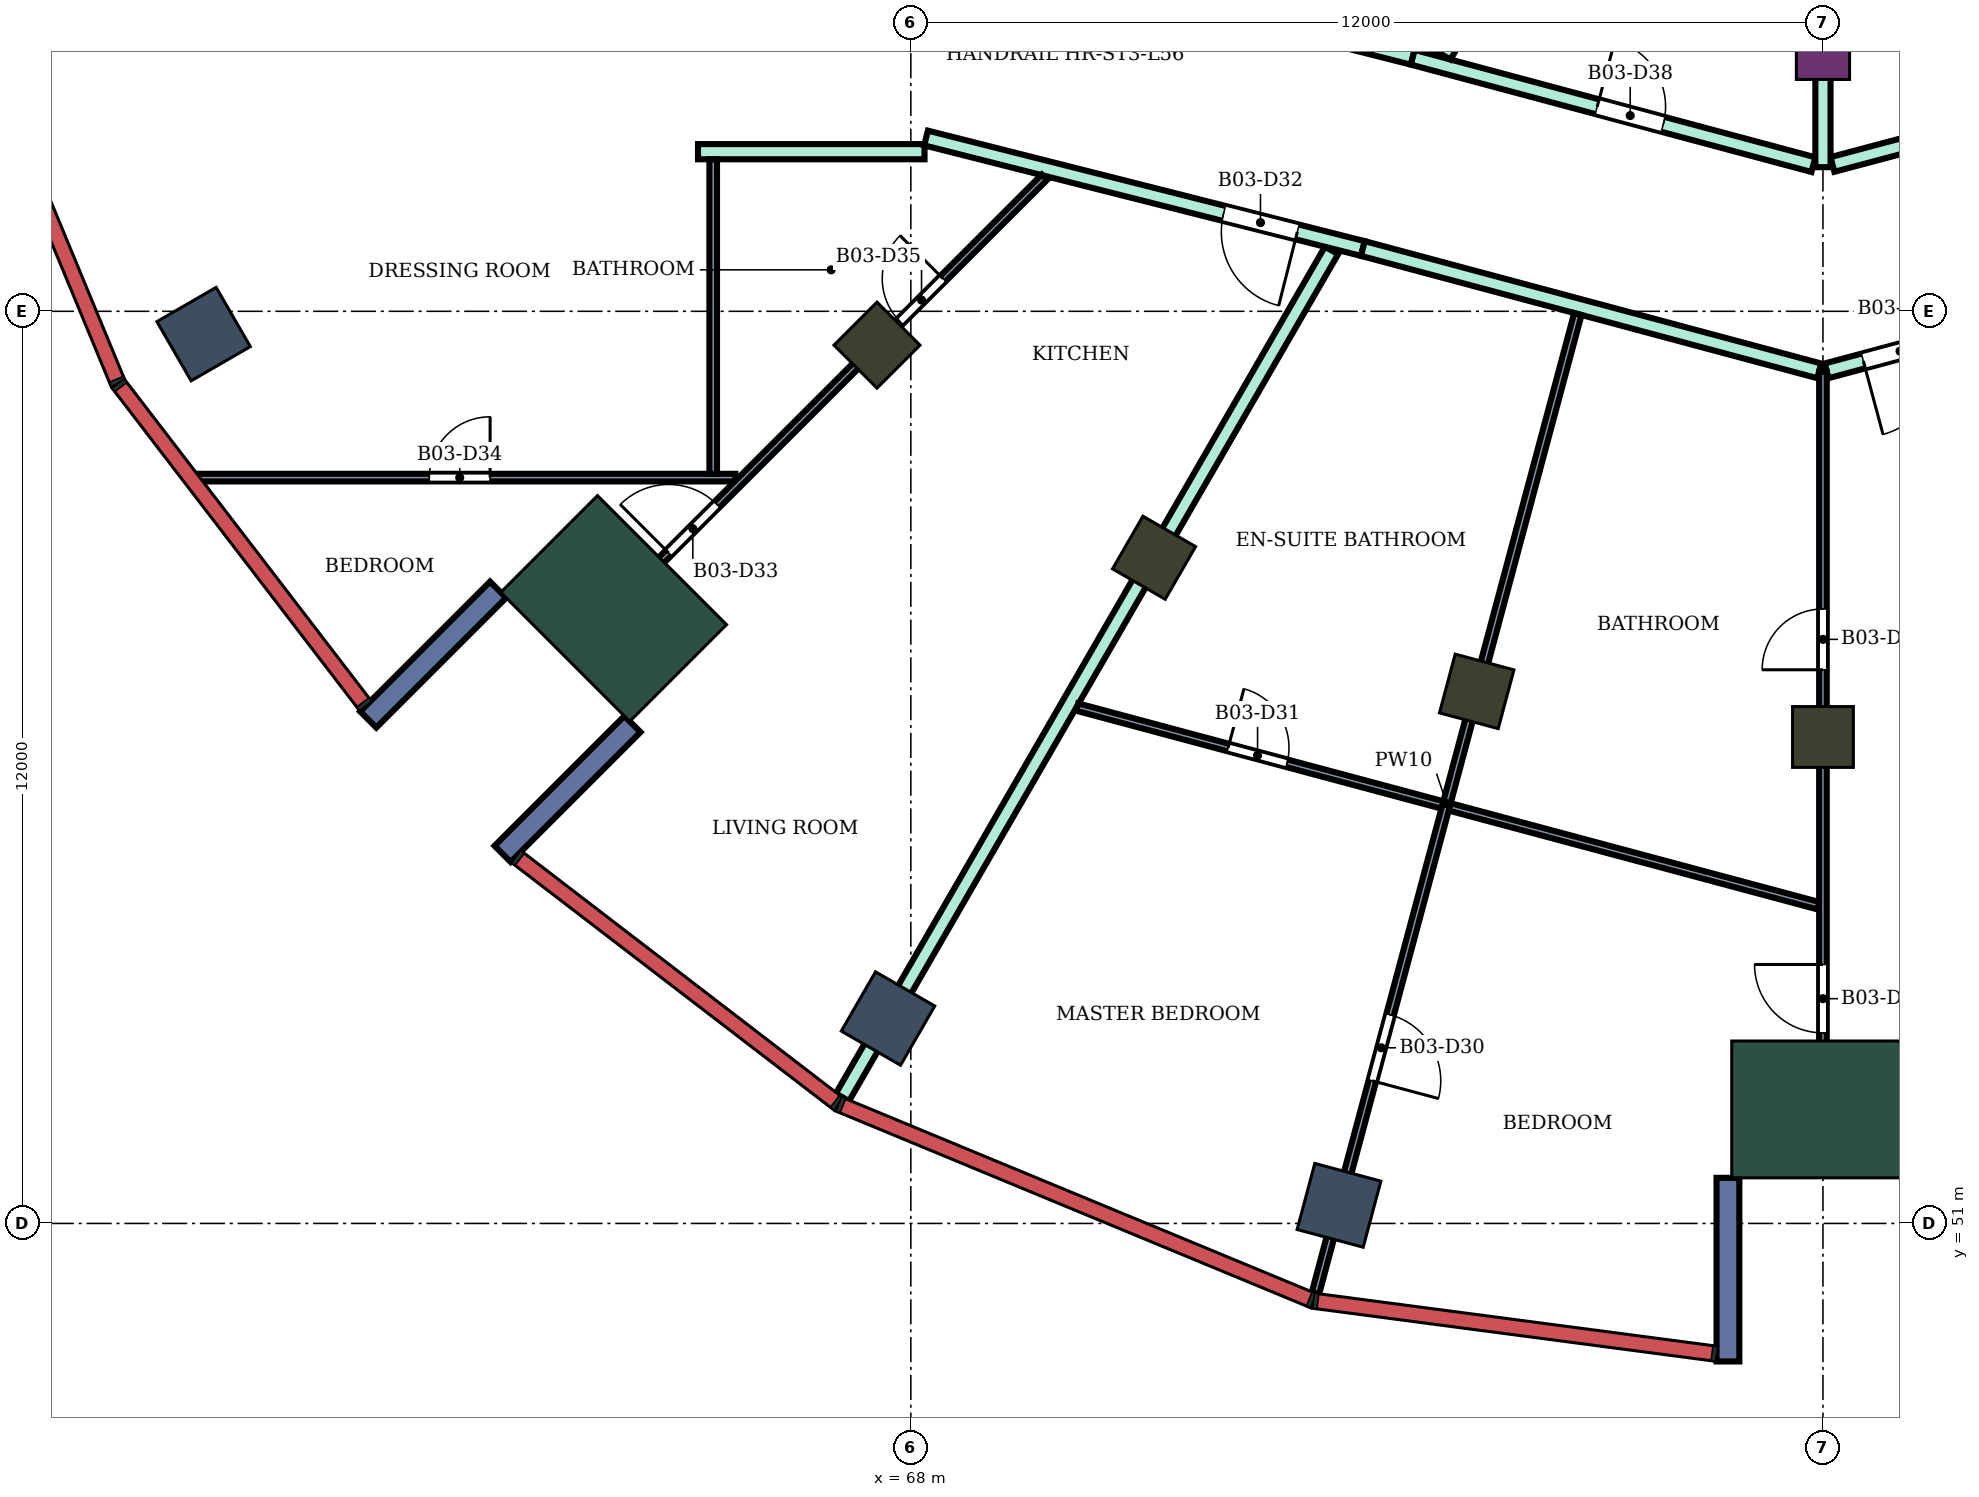
"""IFC4 building model, lengths in metres.
Left out: names, types, materials, properties, quantities, classifications, styles, units other than length and angle.
Written with IfcOpenShell. Run it as: python <this file> out.ifc"""

import sys

from ifc_helpers import new_model, si_unit, direction, frame, frame_2d, origin, origin_2d, place, context, subcontext, project, spatial, rectangle, extrude, element, fill, save


model = new_model("IFC4")
c1 = context("Model", 3, precision=1e-05, world=origin(), true_north=direction((0.0, 1.0)))
c2 = subcontext(c1, "Body", "Model", "MODEL_VIEW")
j1 = project(units=[si_unit("LENGTHUNIT", "METRE"), si_unit("PLANEANGLEUNIT", "RADIAN")], contexts=[c1])
p1 = place(None, origin())
s1 = spatial("IfcSite", under=j1, at=p1, CompositionType="ELEMENT")
p2 = place(p1, origin())
s2 = spatial("IfcBuilding", under=s1, at=p2, CompositionType="ELEMENT")
p3 = place(p2, frame((0.0, 0.0, 245.7)))
s3 = spatial("IfcBuildingStorey", under=s2, at=p3, CompositionType="ELEMENT", Elevation=245.7)
for number, where, z_axis, x_axis in (
    (1, (58.696, 62.7, 0.0), (0.0, 0.0, 1.0), (-0.866, -0.5, 0.0)),
    (2, (67.7, 53.696, 0.0), (0.0, 0.0, 1.0), (-0.5, -0.866, 0.0)),
    (3, (73.633, 51.238, 0.0), (0.0, 0.0, 1.0), (-0.259, -0.966, 0.0)),
):
    element("IfcColumn", number, at=place(p3, frame(where, z_axis=z_axis, x_axis=x_axis)), inside=s3, PredefinedType="COLUMN", context=c2, shape_type="SweptSolid", body=[
        extrude(rectangle(XDim=0.9, YDim=0.9, at=origin_2d()), origin(), (0.0, 0.0, 1.0), 4.2),
    ])
for number, where, z_axis, x_axis in (
    (4, (67.555, 62.555, 0.0), (0.0, 0.0, 1.0), (-0.707, -0.707, 0.0)),
    (5, (71.2, 59.758, 0.0), (0.0, 0.0, 1.0), (-0.5, -0.866, 0.0)),
    (6, (75.445, 58.0, 0.0), (0.0, 0.0, 1.0), (-0.259, -0.966, 0.0)),
    (7, (80.0, 57.4, 0.0), (0.0, 0.0, 1.0), (0.0, -1.0, 0.0)),
):
    element("IfcColumn", number, at=place(p3, frame(where, z_axis=z_axis, x_axis=x_axis)), inside=s3, PredefinedType="COLUMN", context=c2, shape_type="SweptSolid", body=[
        extrude(rectangle(XDim=0.8, YDim=0.8, at=origin_2d()), origin(), (0.0, 0.0, 1.0), 4.2),
    ])
p4 = place(p3, frame((80.0, 66.4, 0.0), z_axis=(0.0, 0.0, 1.0), x_axis=(0.0, -1.0, 0.0)))
e8 = element("IfcColumn", 8, at=p4, inside=s3, PredefinedType="COLUMN", context=c2, shape_type="SweptSolid", body=[
    extrude(rectangle(XDim=0.7, YDim=0.7, at=origin_2d()), origin(), (0.0, 0.0, 1.0), 4.2),
])
for number, where, z_axis, x_axis in (
    (9, (64.09, 59.09, 0.0), (0.0, 0.0, 1.0), (-0.707, -0.707, 0.0)),
    (10, (80.0, 52.5, 0.0), (0.0, 0.0, 1.0), (0.0, -1.0, 0.0)),
):
    element("IfcColumn", number, at=place(p3, frame(where, z_axis=z_axis, x_axis=x_axis)), inside=s3, PredefinedType="COLUMN", context=c2, shape_type="SweptSolid", body=[
        extrude(rectangle(XDim=1.8, YDim=2.4, at=origin_2d()), origin(), (0.0, 0.0, 1.0), 4.2),
    ])
for number, where, z_axis, x_axis in (
    (11, (62.57, 59.338, 0.0), (0.0, 0.0, 1.0), (-0.707, -0.707, 0.0)),
    (12, (64.338, 57.57, 0.0), (0.0, 0.0, 1.0), (-0.707, -0.707, 0.0)),
    (13, (78.75, 51.6, 0.0), (0.0, 0.0, 1.0), (0.0, -1.0, 0.0)),
):
    element("IfcWall", number, at=place(p3, frame(where, z_axis=z_axis, x_axis=x_axis)), inside=s3, PredefinedType="NOTDEFINED", context=c2, shape_type="SweptSolid", body=[
        extrude(rectangle(XDim=2.416, YDim=0.3, at=frame_2d((1.208, 0.0))), origin(), (0.0, 0.0, 1.0), 4.2),
    ])
p5 = place(p3, frame((65.2, 65.1, 0.0), z_axis=(0.0, 0.0, 1.0), x_axis=(1.0, 0.0, 0.0)))
e14 = element("IfcWall", 14, at=p5, inside=s3, PredefinedType="PARTITIONING", context=c2, shape_type="SweptSolid", body=[
    extrude(rectangle(XDim=2.98, YDim=0.2, at=frame_2d((1.49, 0.0))), origin(), (0.0, 0.0, 1.0), 3.75),
])
p6 = place(p3, frame((67.1, 52.659, 0.0), z_axis=(0.0, 0.0, 1.0), x_axis=(0.500128690501, 0.865951091539, 0.0)))
e15 = element("IfcWall", 15, at=p6, inside=s3, PredefinedType="PARTITIONING", context=c2, shape_type="SweptSolid", body=[
    extrude(rectangle(XDim=12.866, YDim=0.2, at=frame_2d((6.433, 0.0))), origin(), (0.0, 0.0, 1.0), 3.75),
])
p7 = place(p3, frame((68.2, 65.28, 0.0), z_axis=(0.0, 0.0, 1.0), x_axis=(0.969450596516, -0.245286650503, 0.0)))
e16 = element("IfcWall", 16, at=p7, inside=s3, PredefinedType="PARTITIONING", context=c2, shape_type="SweptSolid", body=[
    extrude(rectangle(XDim=5.928, YDim=0.2, at=frame_2d((2.964, 0.0))), origin(), (0.0, 0.0, 1.0), 3.75),
])
p8 = place(p7, frame((4.039, 0.0, 0.0)))
e17 = element("IfcOpeningElement", 17, at=p8, cuts=e16, PredefinedType="OPENING", context=c2, shape_type="SweptSolid", body=[
    extrude(rectangle(XDim=1.0, YDim=2.1, at=frame_2d((0.5, 1.05))), frame((0.0, 0.11, 0.0), z_axis=(0.0, -1.0, 0.0), x_axis=(1.0, 0.0, 0.0)), (0.0, 0.0, 1.0), 0.22),
])
p9 = place(p3, frame((72.1, 66.975, 0.0), z_axis=(0.0, 0.0, 1.0), x_axis=(0.969471314457, -0.245204752086, 0.0)))
e18 = element("IfcWall", 18, at=p9, inside=s3, PredefinedType="PARTITIONING", context=c2, shape_type="SweptSolid", body=[
    extrude(rectangle(XDim=2.582, YDim=0.2, at=frame_2d((1.291, 0.0))), origin(), (0.0, 0.0, 1.0), 3.75),
])
p10 = place(p9, frame((0.841, 0.0, 0.0)))
e19 = element("IfcOpeningElement", 19, at=p10, cuts=e18, PredefinedType="OPENING", context=c2, shape_type="SweptSolid", body=[
    extrude(rectangle(XDim=0.9, YDim=2.1, at=frame_2d((0.45, 1.05))), frame((0.0, 0.11, 0.0), z_axis=(0.0, -1.0, 0.0), x_axis=(1.0, 0.0, 0.0)), (0.0, 0.0, 1.0), 0.22),
])
p11 = place(p3, frame((73.947, 63.826, 0.0), z_axis=(0.0, 0.0, 1.0), x_axis=(0.965908253407, -0.258884619088, 0.0)))
e20 = element("IfcWall", 20, at=p11, inside=s3, PredefinedType="PARTITIONING", context=c2, shape_type="SweptSolid", body=[
    extrude(rectangle(XDim=6.217, YDim=0.2, at=frame_2d((3.108, 0.0))), origin(), (0.0, 0.0, 1.0), 3.75),
])
p12 = place(p3, frame((74.603, 66.342, 0.0), z_axis=(0.0, 0.0, 1.0), x_axis=(0.965920893652, -0.258837453254, 0.0)))
e21 = element("IfcWall", 21, at=p12, inside=s3, PredefinedType="PARTITIONING", context=c2, shape_type="SweptSolid", body=[
    extrude(rectangle(XDim=5.458, YDim=0.2, at=frame_2d((2.729, 0.0))), origin(), (0.0, 0.0, 1.0), 3.75),
])
p13 = place(p12, frame((2.512, 0.0, 0.0)))
e22 = element("IfcOpeningElement", 22, at=p13, cuts=e21, PredefinedType="OPENING", context=c2, shape_type="SweptSolid", body=[
    extrude(rectangle(XDim=0.9, YDim=2.1, at=frame_2d((0.45, 1.05))), frame((0.0, 0.11, 0.0), z_axis=(0.0, -1.0, 0.0), x_axis=(1.0, 0.0, 0.0)), (0.0, 0.0, 1.0), 0.22),
])
p14 = place(p3, frame((75.014, 66.362, 0.0), z_axis=(0.0, 0.0, 1.0), x_axis=(0.500097042406, 0.865969369075, 0.0)))
e23 = element("IfcWall", 23, at=p14, inside=s3, PredefinedType="PARTITIONING", context=c2, shape_type="SweptSolid", body=[
    extrude(rectangle(XDim=2.275, YDim=0.2, at=frame_2d((1.138, 0.0))), origin(), (0.0, 0.0, 1.0), 3.75),
])
p15 = place(p3, frame((80.125, 64.932, 0.0), z_axis=(0.0, 0.0, 1.0), x_axis=(0.966236955806, 0.257655089674, 0.0)))
e24 = element("IfcWall", 24, at=p15, inside=s3, PredefinedType="PARTITIONING", context=c2, shape_type="SweptSolid", body=[
    extrude(rectangle(XDim=8.039, YDim=0.2, at=frame_2d((4.02, 0.0))), origin(), (0.0, 0.0, 1.0), 3.75),
])
p16 = place(p15, frame((6.298, 0.0, 0.0)))
e25 = element("IfcOpeningElement", 25, at=p16, cuts=e24, PredefinedType="OPENING", context=c2, shape_type="SweptSolid", body=[
    extrude(rectangle(XDim=0.9, YDim=2.1, at=frame_2d((0.45, 1.05))), frame((0.0, 0.11, 0.0), z_axis=(0.0, -1.0, 0.0), x_axis=(1.0, 0.0, 0.0)), (0.0, 0.0, 1.0), 0.22),
])
p17 = place(p15, frame((2.045, 0.0, 0.0)))
e26 = element("IfcOpeningElement", 26, at=p17, cuts=e24, PredefinedType="OPENING", context=c2, shape_type="SweptSolid", body=[
    extrude(rectangle(XDim=0.9, YDim=2.1, at=frame_2d((0.45, 1.05))), frame((0.0, 0.11, 0.0), z_axis=(0.0, -1.0, 0.0), x_axis=(1.0, 0.0, 0.0)), (0.0, 0.0, 1.0), 0.22),
])
p18 = place(p3, frame((80.048, 62.217, 0.0), z_axis=(0.0, 0.0, 1.0), x_axis=(0.965941520544, 0.258760466242, 0.0)))
e27 = element("IfcWall", 27, at=p18, inside=s3, PredefinedType="PARTITIONING", context=c2, shape_type="SweptSolid", body=[
    extrude(rectangle(XDim=6.006, YDim=0.2, at=frame_2d((3.003, 0.0))), origin(), (0.0, 0.0, 1.0), 3.75),
])
p19 = place(p18, frame((0.5, 0.0, 0.0)))
e28 = element("IfcOpeningElement", 28, at=p19, cuts=e27, PredefinedType="OPENING", context=c2, shape_type="SweptSolid", body=[
    extrude(rectangle(XDim=1.0, YDim=2.1, at=frame_2d((0.5, 1.05))), frame((0.0, 0.11, 0.0), z_axis=(0.0, -1.0, 0.0), x_axis=(1.0, 0.0, 0.0)), (0.0, 0.0, 1.0), 0.22),
])
p20 = place(p3, frame((80.0, 64.896, 0.0), z_axis=(0.0, 0.0, 1.0), x_axis=(0.0, 1.0, 0.0)))
e29 = element("IfcWall", 29, at=p20, inside=s3, PredefinedType="PARTITIONING", context=c2, shape_type="SweptSolid", body=[
    extrude(rectangle(XDim=2.405, YDim=0.2, at=frame_2d((1.203, 0.0))), origin(), (0.0, 0.0, 1.0), 3.75),
])
p21 = place(p3, frame((58.6, 60.812, 0.0), z_axis=(0.0, 0.0, 1.0), x_axis=(1.0, 0.0, 0.0)))
e30 = element("IfcWall", 30, at=p21, inside=s3, PredefinedType="PARTITIONING", context=c2, shape_type="SweptSolid", body=[
    extrude(rectangle(XDim=7.092, YDim=0.1, at=frame_2d((3.546, 0.0))), origin(), (0.0, 0.0, 1.0), 3.75),
])
p22 = place(p21, frame((3.065, 0.0, 0.0)))
e31 = element("IfcOpeningElement", 31, at=p22, cuts=e30, PredefinedType="OPENING", context=c2, shape_type="SweptSolid", body=[
    extrude(rectangle(XDim=0.8, YDim=2.1, at=frame_2d((0.4, 1.05))), frame((0.0, 0.06, 0.0), z_axis=(0.0, -1.0, 0.0), x_axis=(1.0, 0.0, 0.0)), (0.0, 0.0, 1.0), 0.12),
])
p23 = place(p3, frame((63.591, 58.6, 0.0), z_axis=(0.0, 0.0, 1.0), x_axis=(0.707274766636, 0.70693875582, 0.0)))
e32 = element("IfcWall", 32, at=p23, inside=s3, PredefinedType="PARTITIONING", context=c2, shape_type="SweptSolid", body=[
    extrude(rectangle(XDim=8.719, YDim=0.1, at=frame_2d((4.359, 0.0))), origin(), (0.0, 0.0, 1.0), 3.75),
])
p24 = place(p23, frame((1.729, 0.0, 0.0)))
e33 = element("IfcOpeningElement", 33, at=p24, cuts=e32, PredefinedType="OPENING", context=c2, shape_type="SweptSolid", body=[
    extrude(rectangle(XDim=0.9, YDim=2.1, at=frame_2d((0.45, 1.05))), frame((0.0, 0.06, 0.0), z_axis=(0.0, -1.0, 0.0), x_axis=(1.0, 0.0, 0.0)), (0.0, 0.0, 1.0), 0.12),
])
p25 = place(p23, frame((6.033, 0.0, 0.0)))
e34 = element("IfcOpeningElement", 34, at=p25, cuts=e32, PredefinedType="OPENING", context=c2, shape_type="SweptSolid", body=[
    extrude(rectangle(XDim=0.8, YDim=2.1, at=frame_2d((0.4, 1.05))), frame((0.0, 0.06, 0.0), z_axis=(0.0, -1.0, 0.0), x_axis=(1.0, 0.0, 0.0)), (0.0, 0.0, 1.0), 0.12),
])
p26 = place(p3, frame((65.4, 60.862, 0.0), z_axis=(0.0, 0.0, 1.0), x_axis=(0.0, 1.0, 0.0)))
e35 = element("IfcWall", 35, at=p26, inside=s3, PredefinedType="PARTITIONING", context=c2, shape_type="SweptSolid", body=[
    extrude(rectangle(XDim=4.138, YDim=0.1, at=frame_2d((2.069, 0.0))), origin(), (0.0, 0.0, 1.0), 3.75),
])
p27 = place(p3, frame((70.188, 57.793, 0.0), z_axis=(0.0, 0.0, 1.0), x_axis=(0.965911138035, -0.258873856194, 0.0)))
e36 = element("IfcWall", 36, at=p27, inside=s3, PredefinedType="PARTITIONING", context=c2, shape_type="SweptSolid", body=[
    extrude(rectangle(XDim=10.098, YDim=0.1, at=frame_2d((5.049, 0.0))), origin(), (0.0, 0.0, 1.0), 3.75),
])
p28 = place(p27, frame((2.057, 0.0, 0.0)))
e37 = element("IfcOpeningElement", 37, at=p28, cuts=e36, PredefinedType="OPENING", context=c2, shape_type="SweptSolid", body=[
    extrude(rectangle(XDim=0.8, YDim=2.1, at=frame_2d((0.4, 1.05))), frame((0.0, 0.06, 0.0), z_axis=(0.0, -1.0, 0.0), x_axis=(1.0, 0.0, 0.0)), (0.0, 0.0, 1.0), 0.12),
])
p29 = place(p3, frame((73.323, 50.081, 0.0), z_axis=(0.0, 0.0, 1.0), x_axis=(0.258837030899, 0.96592100683, 0.0)))
e38 = element("IfcWall", 38, at=p29, inside=s3, PredefinedType="PARTITIONING", context=c2, shape_type="SweptSolid", body=[
    extrude(rectangle(XDim=13.338, YDim=0.1, at=frame_2d((6.669, 0.0))), origin(), (0.0, 0.0, 1.0), 3.75),
])
p30 = place(p29, frame((2.894, 0.0, 0.0)))
e39 = element("IfcOpeningElement", 39, at=p30, cuts=e38, PredefinedType="OPENING", context=c2, shape_type="SweptSolid", body=[
    extrude(rectangle(XDim=0.9, YDim=2.1, at=frame_2d((0.45, 1.05))), frame((0.0, 0.06, 0.0), z_axis=(0.0, -1.0, 0.0), x_axis=(1.0, 0.0, 0.0)), (0.0, 0.0, 1.0), 0.12),
])
p31 = place(p3, frame((80.0, 51.8, 0.0), z_axis=(0.0, 0.0, 1.0), x_axis=(0.0, 1.0, 0.0)))
e40 = element("IfcWall", 40, at=p31, inside=s3, PredefinedType="PARTITIONING", context=c2, shape_type="SweptSolid", body=[
    extrude(rectangle(XDim=10.404, YDim=0.1, at=frame_2d((5.202, 0.0))), origin(), (0.0, 0.0, 1.0), 3.75),
])
p32 = place(p31, frame((1.707, 0.0, 0.0)))
e41 = element("IfcOpeningElement", 41, at=p32, cuts=e40, PredefinedType="OPENING", context=c2, shape_type="SweptSolid", body=[
    extrude(rectangle(XDim=0.9, YDim=2.1, at=frame_2d((0.45, 1.05))), frame((0.0, 0.06, 0.0), z_axis=(0.0, -1.0, 0.0), x_axis=(1.0, 0.0, 0.0)), (0.0, 0.0, 1.0), 0.12),
])
p33 = place(p31, frame((6.484, 0.0, 0.0)))
e42 = element("IfcOpeningElement", 42, at=p33, cuts=e40, PredefinedType="OPENING", context=c2, shape_type="SweptSolid", body=[
    extrude(rectangle(XDim=0.8, YDim=2.1, at=frame_2d((0.4, 1.05))), frame((0.0, 0.06, 0.0), z_axis=(0.0, -1.0, 0.0), x_axis=(1.0, 0.0, 0.0)), (0.0, 0.0, 1.0), 0.12),
])
p34 = place(p19, frame((1.0, 0.0, 0.0), z_axis=(0.0, 0.0, 1.0), x_axis=(-1.0, 0.0, 0.0)))
e43 = element("IfcDoor", 43, at=p34, inside=s3, OperationType="SINGLE_SWING_RIGHT", PredefinedType="DOOR", context=c2, shape_type="SweptSolid", body=[
    extrude(rectangle(XDim=1.0, YDim=2.1, at=frame_2d((0.5, 1.05))), frame((0.0, 0.025, 0.0), z_axis=(0.0, -1.0, 0.0), x_axis=(1.0, 0.0, 0.0)), (0.0, 0.0, 1.0), 0.05),
])
fill(e28, e43)
p35 = place(p32, origin())
e44 = element("IfcDoor", 44, at=p35, inside=s3, OperationType="SINGLE_SWING_RIGHT", PredefinedType="DOOR", context=c2, shape_type="SweptSolid", body=[
    extrude(rectangle(XDim=0.9, YDim=2.1, at=frame_2d((0.45, 1.05))), frame((0.0, 0.025, 0.0), z_axis=(0.0, -1.0, 0.0), x_axis=(1.0, 0.0, 0.0)), (0.0, 0.0, 1.0), 0.05),
])
fill(e41, e44)
p36 = place(p33, origin())
e45 = element("IfcDoor", 45, at=p36, inside=s3, OperationType="SINGLE_SWING_LEFT", PredefinedType="DOOR", context=c2, shape_type="SweptSolid", body=[
    extrude(rectangle(XDim=0.8, YDim=2.1, at=frame_2d((0.4, 1.05))), frame((0.0, 0.025, 0.0), z_axis=(0.0, -1.0, 0.0), x_axis=(1.0, 0.0, 0.0)), (0.0, 0.0, 1.0), 0.05),
])
fill(e42, e45)
p37 = place(p30, frame((0.9, 0.0, 0.0), z_axis=(0.0, 0.0, 1.0), x_axis=(-1.0, 0.0, 0.0)))
e46 = element("IfcDoor", 46, at=p37, inside=s3, OperationType="SINGLE_SWING_RIGHT", PredefinedType="DOOR", context=c2, shape_type="SweptSolid", body=[
    extrude(rectangle(XDim=0.9, YDim=2.1, at=frame_2d((0.45, 1.05))), frame((0.0, 0.025, 0.0), z_axis=(0.0, -1.0, 0.0), x_axis=(1.0, 0.0, 0.0)), (0.0, 0.0, 1.0), 0.05),
])
fill(e39, e46)
p38 = place(p28, origin())
e47 = element("IfcDoor", 47, at=p38, inside=s3, OperationType="SINGLE_SWING_LEFT", PredefinedType="DOOR", context=c2, shape_type="SweptSolid", body=[
    extrude(rectangle(XDim=0.8, YDim=2.1, at=frame_2d((0.4, 1.05))), frame((0.0, 0.025, 0.0), z_axis=(0.0, -1.0, 0.0), x_axis=(1.0, 0.0, 0.0)), (0.0, 0.0, 1.0), 0.05),
])
fill(e37, e47)
p39 = place(p8, frame((1.0, 0.0, 0.0), z_axis=(0.0, 0.0, 1.0), x_axis=(-1.0, 0.0, 0.0)))
e48 = element("IfcDoor", 48, at=p39, inside=s3, OperationType="SINGLE_SWING_LEFT", PredefinedType="DOOR", context=c2, shape_type="SweptSolid", body=[
    extrude(rectangle(XDim=1.0, YDim=2.1, at=frame_2d((0.5, 1.05))), frame((0.0, 0.025, 0.0), z_axis=(0.0, -1.0, 0.0), x_axis=(1.0, 0.0, 0.0)), (0.0, 0.0, 1.0), 0.05),
])
fill(e17, e48)
p40 = place(p24, origin())
e49 = element("IfcDoor", 49, at=p40, inside=s3, OperationType="SINGLE_SWING_LEFT", PredefinedType="DOOR", context=c2, shape_type="SweptSolid", body=[
    extrude(rectangle(XDim=0.9, YDim=2.1, at=frame_2d((0.45, 1.05))), frame((0.0, 0.025, 0.0), z_axis=(0.0, -1.0, 0.0), x_axis=(1.0, 0.0, 0.0)), (0.0, 0.0, 1.0), 0.05),
])
fill(e33, e49)
p41 = place(p22, origin())
e50 = element("IfcDoor", 50, at=p41, inside=s3, OperationType="SINGLE_SWING_RIGHT", PredefinedType="DOOR", context=c2, shape_type="SweptSolid", body=[
    extrude(rectangle(XDim=0.8, YDim=2.1, at=frame_2d((0.4, 1.05))), frame((0.0, 0.025, 0.0), z_axis=(0.0, -1.0, 0.0), x_axis=(1.0, 0.0, 0.0)), (0.0, 0.0, 1.0), 0.05),
])
fill(e31, e50)
p42 = place(p25, origin())
e51 = element("IfcDoor", 51, at=p42, inside=s3, OperationType="SINGLE_SWING_RIGHT", PredefinedType="DOOR", context=c2, shape_type="SweptSolid", body=[
    extrude(rectangle(XDim=0.8, YDim=2.1, at=frame_2d((0.4, 1.05))), frame((0.0, 0.025, 0.0), z_axis=(0.0, -1.0, 0.0), x_axis=(1.0, 0.0, 0.0)), (0.0, 0.0, 1.0), 0.05),
])
fill(e34, e51)
p43 = place(p13, origin())
e52 = element("IfcDoor", 52, at=p43, inside=s3, OperationType="SINGLE_SWING_LEFT", PredefinedType="DOOR", context=c2, shape_type="SweptSolid", body=[
    extrude(rectangle(XDim=0.9, YDim=2.1, at=frame_2d((0.45, 1.05))), frame((0.0, 0.025, 0.0), z_axis=(0.0, -1.0, 0.0), x_axis=(1.0, 0.0, 0.0)), (0.0, 0.0, 1.0), 0.05),
])
fill(e22, e52)
save(model, sys.argv[1])
